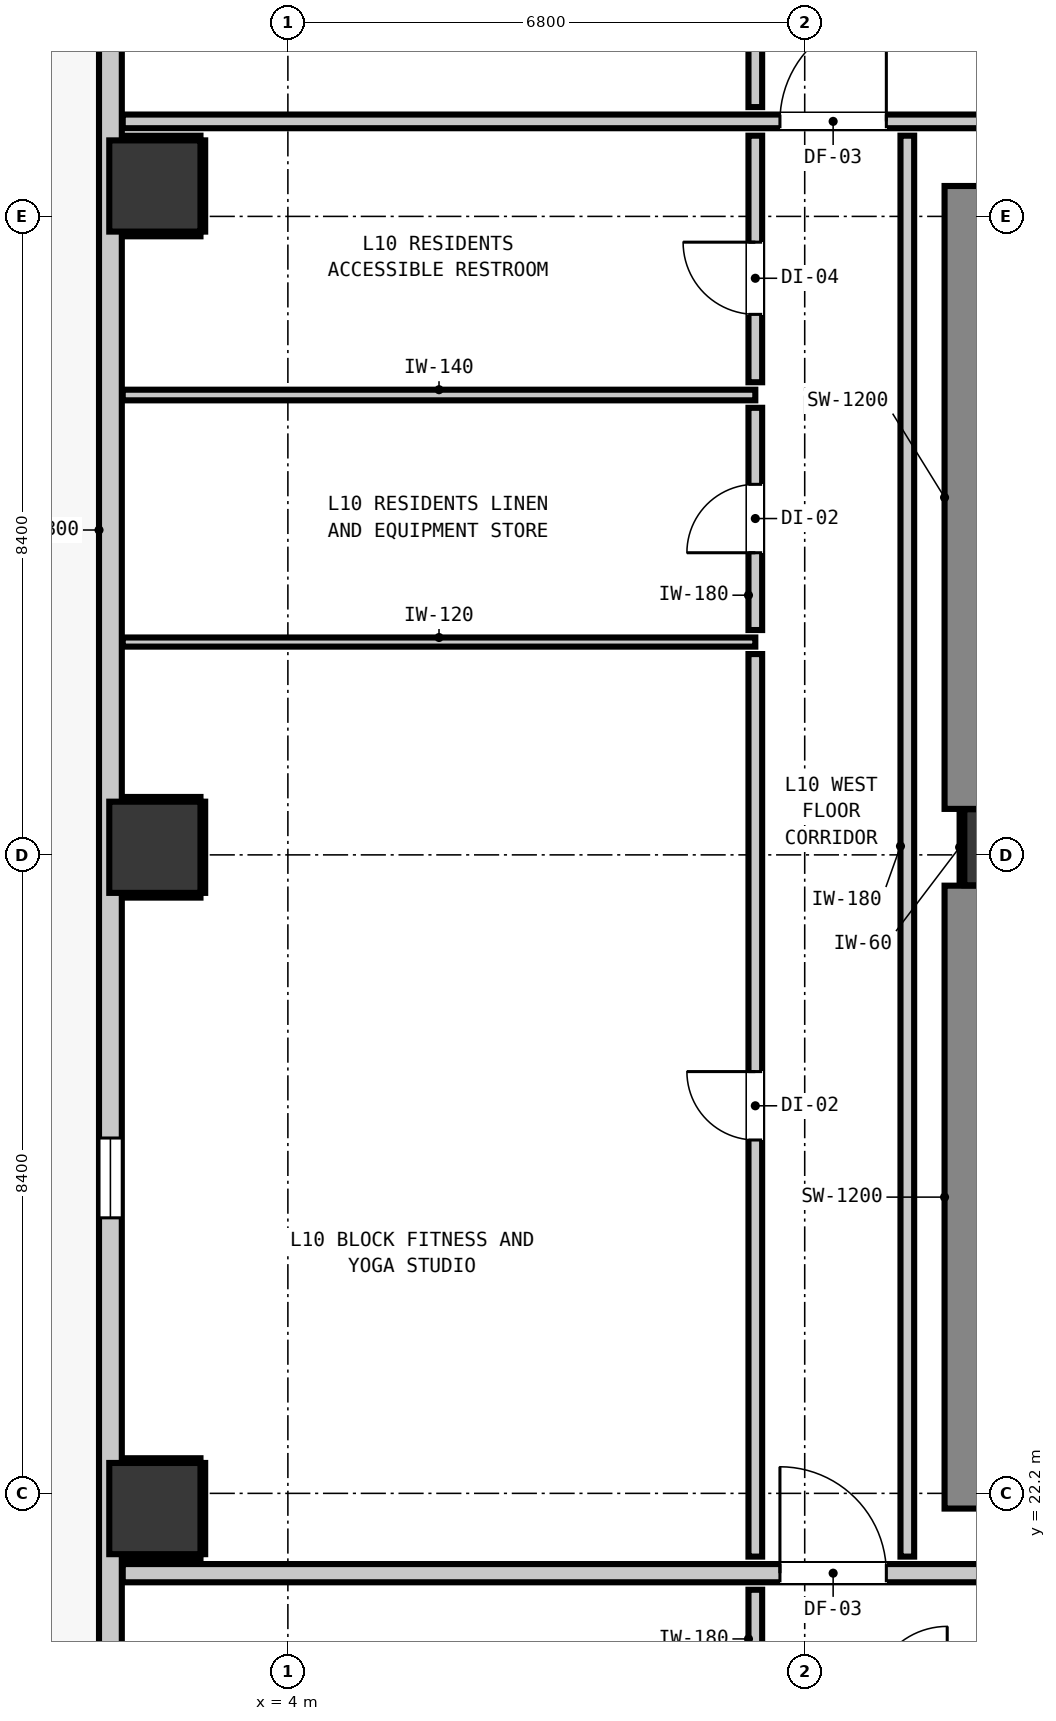
"""IFC4 building model, lengths in metres.
Left out: names, types, materials, properties, quantities, classifications, styles, units other than length and angle.
Written with IfcOpenShell. Run it as: python <this file> out.ifc"""

import sys

from ifc_helpers import new_model, si_unit, direction, frame, frame_2d, origin, origin_2d, place, context, subcontext, project, spatial, rectangle, extrude, element, fill, save


model = new_model("IFC4")
c1 = context("Model", 3, precision=1e-05, world=origin(), true_north=direction((0.0, 1.0)))
c2 = subcontext(c1, "Body", "Model", "MODEL_VIEW")
j1 = project(units=[si_unit("LENGTHUNIT", "METRE"), si_unit("PLANEANGLEUNIT", "RADIAN")], contexts=[c1])
p1 = place(None, origin())
s1 = spatial("IfcSite", under=j1, at=p1, CompositionType="ELEMENT")
p2 = place(p1, origin())
s2 = spatial("IfcBuilding", under=s1, at=p2, CompositionType="ELEMENT")
p3 = place(p2, frame((0.0, 0.0, 38.6)))
s3 = spatial("IfcBuildingStorey", under=s2, at=p3, CompositionType="ELEMENT", Elevation=38.6)
p4 = place(p3, frame((13.4, 30.7, 0.0), z_axis=(0.0, 0.0, 1.0), x_axis=(1.0, 0.0, 0.0)))
e1 = element("IfcColumn", 1, at=p4, inside=s3, PredefinedType="COLUMN", context=c2, shape_type="SweptSolid", body=[
    extrude(rectangle(XDim=1.0, YDim=1.0, at=origin_2d()), origin(), (0.0, 0.0, 1.0), 3.32),
])
p5 = place(p3, frame((13.24, 22.0, 0.0), z_axis=(0.0, 0.0, 1.0), x_axis=(0.0, 1.0, 0.0)))
e2 = element("IfcWall", 2, at=p5, inside=s3, PredefinedType="SHEAR", context=c2, shape_type="SweptSolid", body=[
    extrude(rectangle(XDim=8.195, YDim=1.2, at=frame_2d((4.098, 0.0))), origin(), (0.0, 0.0, 1.0), 3.32),
])
p6 = place(p3, frame((13.24, 31.205, 0.0), z_axis=(0.0, 0.0, 1.0), x_axis=(0.0, 1.0, 0.0)))
e3 = element("IfcWall", 3, at=p6, inside=s3, PredefinedType="SHEAR", context=c2, shape_type="SweptSolid", body=[
    extrude(rectangle(XDim=8.195, YDim=1.2, at=frame_2d((4.097, 0.0))), origin(), (0.0, 0.0, 1.0), 3.32),
])
for number, where, z_axis, x_axis in (
    (4, (2.25, 22.0, 0.0), (0.0, 0.0, 1.0), (1.0, 0.0, 0.0)),
    (5, (2.25, 30.7, 0.0), (0.0, 0.0, 1.0), (1.0, 0.0, 0.0)),
    (6, (2.25, 39.4, 0.0), (0.0, 0.0, 1.0), (1.0, 0.0, 0.0)),
):
    element("IfcColumn", number, at=place(p3, frame(where, z_axis=z_axis, x_axis=x_axis)), inside=s3, PredefinedType="COLUMN", context=c2, shape_type="SweptSolid", body=[
        extrude(rectangle(XDim=1.2, YDim=1.2, at=origin_2d()), origin(), (0.0, 0.0, 1.0), 2.9),
    ])
p7 = place(p3, frame((1.665, 10.165, 0.0), z_axis=(0.0, 0.0, 1.0), x_axis=(0.0, 1.0, 0.0)))
e7 = element("IfcWall", 7, at=p7, inside=s3, PredefinedType="STANDARD", context=c2, shape_type="SweptSolid", body=[
    extrude(rectangle(XDim=34.67, YDim=0.3, at=frame_2d((17.335, 0.0))), origin(), (0.0, 0.0, 1.0), 2.9),
])
p8 = place(p7, frame((0.901, 0.0, 0.0)))
e8 = element("IfcOpeningElement", 8, at=p8, cuts=e7, PredefinedType="OPENING", context=c2, shape_type="SweptSolid", body=[
    extrude(rectangle(XDim=1.0, YDim=2.15, at=frame_2d((0.5, 1.075))), frame((0.0, 0.16, 0.0), z_axis=(0.0, -1.0, 0.0), x_axis=(1.0, 0.0, 0.0)), (0.0, 0.0, 1.0), 0.32),
])
p9 = place(p7, frame((32.708, 0.0, 0.85)))
e9 = element("IfcOpeningElement", 9, at=p9, cuts=e7, PredefinedType="OPENING", context=c2, shape_type="SweptSolid", body=[
    extrude(rectangle(XDim=1.05, YDim=1.65, at=frame_2d((0.525, 0.825))), frame((0.0, 0.16, 0.0), z_axis=(0.0, -1.0, 0.0), x_axis=(1.0, 0.0, 0.0)), (0.0, 0.0, 1.0), 0.32),
])
p10 = place(p7, frame((15.66, 0.0, 0.85)))
e10 = element("IfcOpeningElement", 10, at=p10, cuts=e7, PredefinedType="OPENING", context=c2, shape_type="SweptSolid", body=[
    extrude(rectangle(XDim=1.05, YDim=1.65, at=frame_2d((0.525, 0.825))), frame((0.0, 0.16, 0.0), z_axis=(0.0, -1.0, 0.0), x_axis=(1.0, 0.0, 0.0)), (0.0, 0.0, 1.0), 0.32),
])
p11 = place(p3, frame((1.827, 21.15, 0.0), z_axis=(0.0, 0.0, 1.0), x_axis=(1.0, 0.0, 0.0)))
e11 = element("IfcWall", 11, at=p11, inside=s3, PredefinedType="PARTITIONING", context=c2, shape_type="SweptSolid", body=[
    extrude(rectangle(XDim=42.146, YDim=0.24, at=frame_2d((21.073, 0.0))), origin(), (0.0, 0.0, 1.0), 2.9),
])
p12 = place(p11, frame((16.383, 0.0, 0.0)))
e12 = element("IfcOpeningElement", 12, at=p12, cuts=e11, PredefinedType="OPENING", context=c2, shape_type="SweptSolid", body=[
    extrude(rectangle(XDim=1.1, YDim=2.15, at=frame_2d((0.55, 1.075))), frame((0.0, 0.13, 0.0), z_axis=(0.0, -1.0, 0.0), x_axis=(1.0, 0.0, 0.0)), (0.0, 0.0, 1.0), 0.26),
])
p13 = place(p11, frame((8.647, 0.0, 0.0)))
e13 = element("IfcOpeningElement", 13, at=p13, cuts=e11, PredefinedType="OPENING", context=c2, shape_type="SweptSolid", body=[
    extrude(rectangle(XDim=1.4, YDim=2.15, at=frame_2d((0.7, 1.075))), frame((0.0, 0.13, 0.0), z_axis=(0.0, -1.0, 0.0), x_axis=(1.0, 0.0, 0.0)), (0.0, 0.0, 1.0), 0.26),
])
p14 = place(p11, frame((38.524, 0.0, 0.0)))
e14 = element("IfcOpeningElement", 14, at=p14, cuts=e11, PredefinedType="OPENING", context=c2, shape_type="SweptSolid", body=[
    extrude(rectangle(XDim=1.0, YDim=2.15, at=frame_2d((0.5, 1.075))), frame((0.0, 0.13, 0.0), z_axis=(0.0, -1.0, 0.0), x_axis=(1.0, 0.0, 0.0)), (0.0, 0.0, 1.0), 0.26),
])
p15 = place(p3, frame((1.827, 40.25, 0.0), z_axis=(0.0, 0.0, 1.0), x_axis=(1.0, 0.0, 0.0)))
e15 = element("IfcWall", 15, at=p15, inside=s3, PredefinedType="PARTITIONING", context=c2, shape_type="SweptSolid", body=[
    extrude(rectangle(XDim=42.146, YDim=0.18, at=frame_2d((21.073, 0.0))), origin(), (0.0, 0.0, 1.0), 2.9),
])
p16 = place(p15, frame((15.608, 0.0, 0.0)))
e16 = element("IfcOpeningElement", 16, at=p16, cuts=e15, PredefinedType="OPENING", context=c2, shape_type="SweptSolid", body=[
    extrude(rectangle(XDim=1.4, YDim=2.15, at=frame_2d((0.7, 1.075))), frame((0.0, 0.1, 0.0), z_axis=(0.0, -1.0, 0.0), x_axis=(1.0, 0.0, 0.0)), (0.0, 0.0, 1.0), 0.2),
])
p17 = place(p15, frame((8.647, 0.0, 0.0)))
e17 = element("IfcOpeningElement", 17, at=p17, cuts=e15, PredefinedType="OPENING", context=c2, shape_type="SweptSolid", body=[
    extrude(rectangle(XDim=1.4, YDim=2.15, at=frame_2d((0.7, 1.075))), frame((0.0, 0.1, 0.0), z_axis=(0.0, -1.0, 0.0), x_axis=(1.0, 0.0, 0.0)), (0.0, 0.0, 1.0), 0.2),
])
p18 = place(p15, frame((38.574, 0.0, 0.0)))
e18 = element("IfcOpeningElement", 18, at=p18, cuts=e15, PredefinedType="OPENING", context=c2, shape_type="SweptSolid", body=[
    extrude(rectangle(XDim=0.9, YDim=2.1, at=frame_2d((0.45, 1.05))), frame((0.0, 0.1, 0.0), z_axis=(0.0, -1.0, 0.0), x_axis=(1.0, 0.0, 0.0)), (0.0, 0.0, 1.0), 0.2),
])
p19 = place(p3, frame((1.827, 36.65, 0.0), z_axis=(0.0, 0.0, 1.0), x_axis=(1.0, 0.0, 0.0)))
e19 = element("IfcWall", 19, at=p19, inside=s3, PredefinedType="PARTITIONING", context=c2, shape_type="SweptSolid", body=[
    extrude(rectangle(XDim=8.323, YDim=0.14, at=frame_2d((4.162, 0.0))), origin(), (0.0, 0.0, 1.0), 2.9),
])
p20 = place(p3, frame((1.827, 33.4, 0.0), z_axis=(0.0, 0.0, 1.0), x_axis=(1.0, 0.0, 0.0)))
e20 = element("IfcWall", 20, at=p20, inside=s3, PredefinedType="PARTITIONING", context=c2, shape_type="SweptSolid", body=[
    extrude(rectangle(XDim=8.323, YDim=0.12, at=frame_2d((4.162, 0.0))), origin(), (0.0, 0.0, 1.0), 2.9),
])
p21 = place(p3, frame((10.15, 19.638, 0.0), z_axis=(0.0, 0.0, 1.0), x_axis=(0.0, 1.0, 0.0)))
e21 = element("IfcWall", 21, at=p21, inside=s3, PredefinedType="PARTITIONING", context=c2, shape_type="SweptSolid", body=[
    extrude(rectangle(XDim=1.294, YDim=0.18, at=frame_2d((0.647, 0.0))), origin(), (0.0, 0.0, 1.0), 2.9),
])
p22 = place(p3, frame((10.15, 21.368, 0.0), z_axis=(0.0, 0.0, 1.0), x_axis=(0.0, 1.0, 0.0)))
e22 = element("IfcWall", 22, at=p22, inside=s3, PredefinedType="PARTITIONING", context=c2, shape_type="SweptSolid", body=[
    extrude(rectangle(XDim=11.874, YDim=0.18, at=frame_2d((5.937, 0.0))), origin(), (0.0, 0.0, 1.0), 2.9),
])
p23 = place(p22, frame((5.481, 0.0, 0.0)))
e23 = element("IfcOpeningElement", 23, at=p23, cuts=e22, PredefinedType="OPENING", context=c2, shape_type="SweptSolid", body=[
    extrude(rectangle(XDim=0.9, YDim=2.1, at=frame_2d((0.45, 1.05))), frame((0.0, 0.1, 0.0), z_axis=(0.0, -1.0, 0.0), x_axis=(1.0, 0.0, 0.0)), (0.0, 0.0, 1.0), 0.2),
])
p24 = place(p3, frame((10.15, 33.558, 0.0), z_axis=(0.0, 0.0, 1.0), x_axis=(0.0, 1.0, 0.0)))
e24 = element("IfcWall", 24, at=p24, inside=s3, PredefinedType="PARTITIONING", context=c2, shape_type="SweptSolid", body=[
    extrude(rectangle(XDim=2.924, YDim=0.18, at=frame_2d((1.462, 0.0))), origin(), (0.0, 0.0, 1.0), 2.9),
])
p25 = place(p24, frame((1.017, 0.0, 0.0)))
e25 = element("IfcOpeningElement", 25, at=p25, cuts=e24, PredefinedType="OPENING", context=c2, shape_type="SweptSolid", body=[
    extrude(rectangle(XDim=0.9, YDim=2.1, at=frame_2d((0.45, 1.05))), frame((0.0, 0.1, 0.0), z_axis=(0.0, -1.0, 0.0), x_axis=(1.0, 0.0, 0.0)), (0.0, 0.0, 1.0), 0.2),
])
p26 = place(p3, frame((10.15, 36.818, 0.0), z_axis=(0.0, 0.0, 1.0), x_axis=(0.0, 1.0, 0.0)))
e26 = element("IfcWall", 26, at=p26, inside=s3, PredefinedType="PARTITIONING", context=c2, shape_type="SweptSolid", body=[
    extrude(rectangle(XDim=3.244, YDim=0.18, at=frame_2d((1.622, 0.0))), origin(), (0.0, 0.0, 1.0), 2.9),
])
p27 = place(p26, frame((0.893, 0.0, 0.0)))
e27 = element("IfcOpeningElement", 27, at=p27, cuts=e26, PredefinedType="OPENING", context=c2, shape_type="SweptSolid", body=[
    extrude(rectangle(XDim=0.95, YDim=2.1, at=frame_2d((0.475, 1.05))), frame((0.0, 0.1, 0.0), z_axis=(0.0, -1.0, 0.0), x_axis=(1.0, 0.0, 0.0)), (0.0, 0.0, 1.0), 0.2),
])
p28 = place(p3, frame((10.15, 40.438, 0.0), z_axis=(0.0, 0.0, 1.0), x_axis=(0.0, 1.0, 0.0)))
e28 = element("IfcWall", 28, at=p28, inside=s3, PredefinedType="PARTITIONING", context=c2, shape_type="SweptSolid", body=[
    extrude(rectangle(XDim=1.324, YDim=0.18, at=frame_2d((0.662, 0.0))), origin(), (0.0, 0.0, 1.0), 2.9),
])
p29 = place(p3, frame((12.15, 21.368, 0.0), z_axis=(0.0, 0.0, 1.0), x_axis=(0.0, 1.0, 0.0)))
e29 = element("IfcWall", 29, at=p29, inside=s3, PredefinedType="PARTITIONING", context=c2, shape_type="SweptSolid", body=[
    extrude(rectangle(XDim=18.694, YDim=0.18, at=frame_2d((9.347, 0.0))), origin(), (0.0, 0.0, 1.0), 2.9),
])
p30 = place(p3, frame((12.868, 30.21, 0.0), z_axis=(0.0, 0.0, 1.0), x_axis=(0.0, 1.0, 0.0)))
e30 = element("IfcWall", 30, at=p30, inside=s3, PredefinedType="PARTITIONING", context=c2, shape_type="SweptSolid", body=[
    extrude(rectangle(XDim=0.98, YDim=0.06, at=frame_2d((0.49, 0.0))), origin(), (0.0, 0.0, 1.0), 0.905),
])
for number, where, z_axis, x_axis in (
    (31, (1.83, 21.368, 0.0), (0.0, 0.0, 1.0), (1.0, 0.0, 0.0)),
    (32, (1.83, 22.632, 0.0), (0.0, 0.0, 1.0), (1.0, 0.0, 0.0)),
):
    element("IfcWall", number, at=place(p3, frame(where, z_axis=z_axis, x_axis=x_axis)), inside=s3, PredefinedType="PARTITIONING", context=c2, shape_type="SweptSolid", body=[
        extrude(rectangle(XDim=1.02, YDim=0.06, at=frame_2d((0.51, 0.0))), origin(), (0.0, 0.0, 1.0), 0.905),
    ])
p31 = place(p3, frame((2.882, 21.4, 0.0), z_axis=(0.0, 0.0, 1.0), x_axis=(0.0, 1.0, 0.0)))
e33 = element("IfcWall", 33, at=p31, inside=s3, PredefinedType="PARTITIONING", context=c2, shape_type="SweptSolid", body=[
    extrude(rectangle(XDim=1.2, YDim=0.06, at=frame_2d((0.6, 0.0))), origin(), (0.0, 0.0, 1.0), 1.45),
])
for number, where, z_axis, x_axis in (
    (34, (1.83, 30.068, 0.0), (0.0, 0.0, 1.0), (1.0, 0.0, 0.0)),
    (35, (1.83, 31.332, 0.0), (0.0, 0.0, 1.0), (1.0, 0.0, 0.0)),
):
    element("IfcWall", number, at=place(p3, frame(where, z_axis=z_axis, x_axis=x_axis)), inside=s3, PredefinedType="PARTITIONING", context=c2, shape_type="SweptSolid", body=[
        extrude(rectangle(XDim=1.02, YDim=0.06, at=frame_2d((0.51, 0.0))), origin(), (0.0, 0.0, 1.0), 0.905),
    ])
p32 = place(p3, frame((2.882, 30.1, 0.0), z_axis=(0.0, 0.0, 1.0), x_axis=(0.0, 1.0, 0.0)))
e36 = element("IfcWall", 36, at=p32, inside=s3, PredefinedType="PARTITIONING", context=c2, shape_type="SweptSolid", body=[
    extrude(rectangle(XDim=1.2, YDim=0.06, at=frame_2d((0.6, 0.0))), origin(), (0.0, 0.0, 1.0), 1.45),
])
for number, where, z_axis, x_axis in (
    (37, (1.83, 38.768, 0.0), (0.0, 0.0, 1.0), (1.0, 0.0, 0.0)),
    (38, (1.83, 40.032, 0.0), (0.0, 0.0, 1.0), (1.0, 0.0, 0.0)),
):
    element("IfcWall", number, at=place(p3, frame(where, z_axis=z_axis, x_axis=x_axis)), inside=s3, PredefinedType="PARTITIONING", context=c2, shape_type="SweptSolid", body=[
        extrude(rectangle(XDim=1.02, YDim=0.06, at=frame_2d((0.51, 0.0))), origin(), (0.0, 0.0, 1.0), 0.905),
    ])
p33 = place(p3, frame((2.882, 38.8, 0.0), z_axis=(0.0, 0.0, 1.0), x_axis=(0.0, 1.0, 0.0)))
e39 = element("IfcWall", 39, at=p33, inside=s3, PredefinedType="PARTITIONING", context=c2, shape_type="SweptSolid", body=[
    extrude(rectangle(XDim=1.2, YDim=0.06, at=frame_2d((0.6, 0.0))), origin(), (0.0, 0.0, 1.0), 1.45),
])
p34 = place(p10, origin())
e40 = element("IfcWindow", 40, at=p34, inside=s3, PartitioningType="SINGLE_PANEL", PredefinedType="WINDOW", context=c2, shape_type="SweptSolid", body=[
    extrude(rectangle(XDim=1.05, YDim=1.65, at=frame_2d((0.525, 0.825))), frame((0.0, 0.03, 0.0), z_axis=(0.0, -1.0, 0.0), x_axis=(1.0, 0.0, 0.0)), (0.0, 0.0, 1.0), 0.06),
])
fill(e10, e40)
p35 = place(p13, origin())
e41 = element("IfcDoor", 41, at=p35, inside=s3, OperationType="SINGLE_SWING_LEFT", PredefinedType="DOOR", context=c2, shape_type="SweptSolid", body=[
    extrude(rectangle(XDim=1.4, YDim=2.15, at=frame_2d((0.7, 1.075))), frame((0.0, 0.025, 0.0), z_axis=(0.0, -1.0, 0.0), x_axis=(1.0, 0.0, 0.0)), (0.0, 0.0, 1.0), 0.05),
])
fill(e13, e41)
p36 = place(p17, origin())
e42 = element("IfcDoor", 42, at=p36, inside=s3, OperationType="SINGLE_SWING_RIGHT", PredefinedType="DOOR", context=c2, shape_type="SweptSolid", body=[
    extrude(rectangle(XDim=1.4, YDim=2.15, at=frame_2d((0.7, 1.075))), frame((0.0, 0.025, 0.0), z_axis=(0.0, -1.0, 0.0), x_axis=(1.0, 0.0, 0.0)), (0.0, 0.0, 1.0), 0.05),
])
fill(e17, e42)
p37 = place(p23, origin())
e43 = element("IfcDoor", 43, at=p37, inside=s3, OperationType="SINGLE_SWING_RIGHT", PredefinedType="DOOR", context=c2, shape_type="SweptSolid", body=[
    extrude(rectangle(XDim=0.9, YDim=2.1, at=frame_2d((0.45, 1.05))), frame((0.0, 0.025, 0.0), z_axis=(0.0, -1.0, 0.0), x_axis=(1.0, 0.0, 0.0)), (0.0, 0.0, 1.0), 0.05),
])
fill(e23, e43)
p38 = place(p25, origin())
e44 = element("IfcDoor", 44, at=p38, inside=s3, OperationType="SINGLE_SWING_LEFT", PredefinedType="DOOR", context=c2, shape_type="SweptSolid", body=[
    extrude(rectangle(XDim=0.9, YDim=2.1, at=frame_2d((0.45, 1.05))), frame((0.0, 0.025, 0.0), z_axis=(0.0, -1.0, 0.0), x_axis=(1.0, 0.0, 0.0)), (0.0, 0.0, 1.0), 0.05),
])
fill(e25, e44)
p39 = place(p27, origin())
e45 = element("IfcDoor", 45, at=p39, inside=s3, OperationType="SINGLE_SWING_RIGHT", PredefinedType="DOOR", context=c2, shape_type="SweptSolid", body=[
    extrude(rectangle(XDim=0.95, YDim=2.1, at=frame_2d((0.475, 1.05))), frame((0.0, 0.025, 0.0), z_axis=(0.0, -1.0, 0.0), x_axis=(1.0, 0.0, 0.0)), (0.0, 0.0, 1.0), 0.05),
])
fill(e27, e45)
save(model, sys.argv[1])
